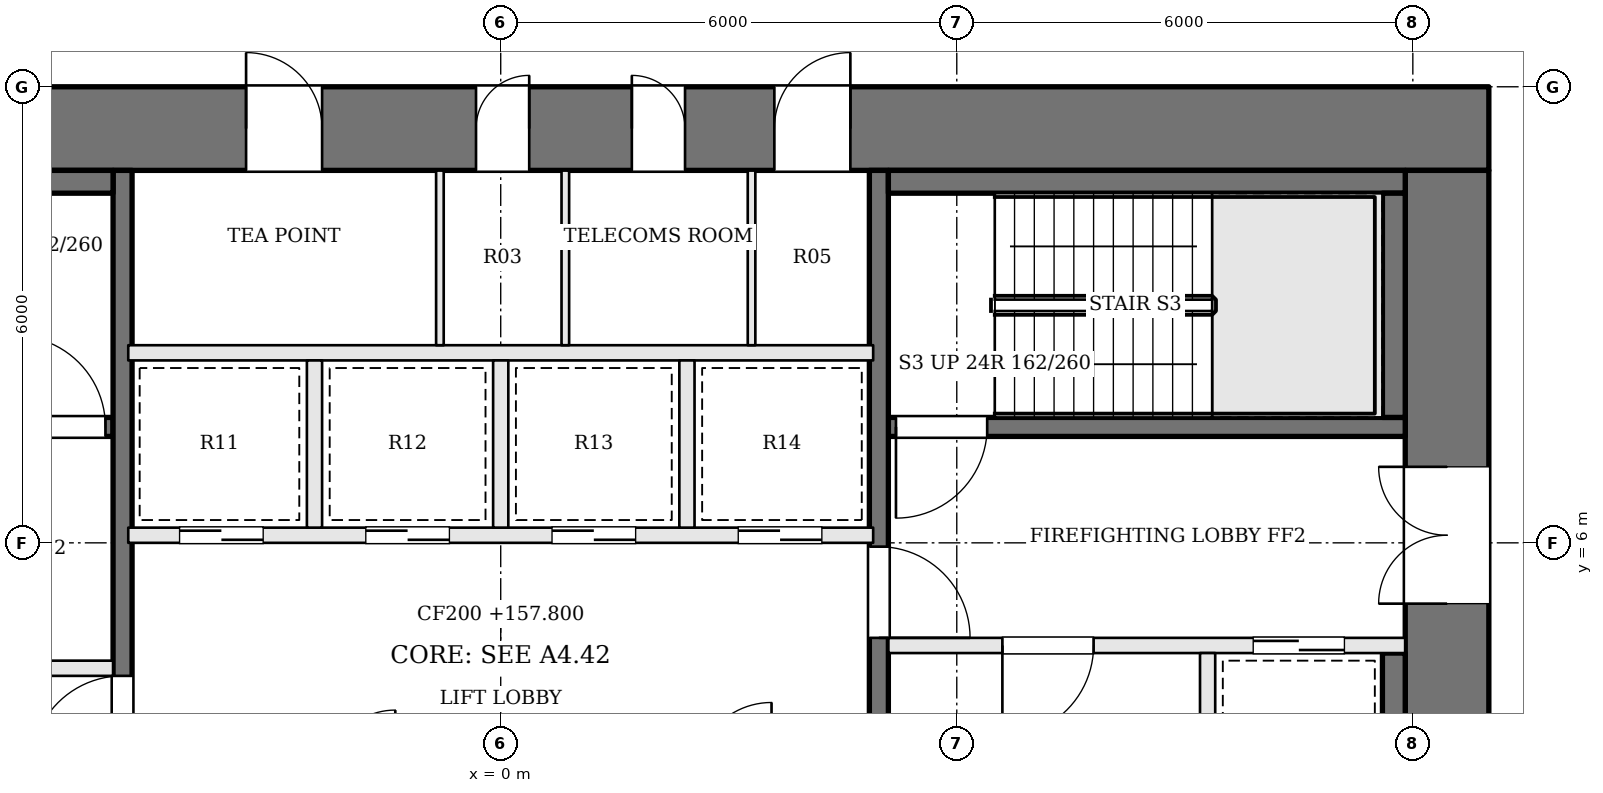
"""IFC4 building model, lengths in metres.
Left out: names, types, materials, properties, quantities, classifications, styles, units other than length and angle.
Written with IfcOpenShell. Run it as: python <this file> out.ifc"""

import sys

from ifc_helpers import new_model, si_unit, direction, frame, frame_2d, origin, place, context, subcontext, project, spatial, rectangle, extrude, element, fill, save


model = new_model("IFC4")
c1 = context("Model", 3, precision=1e-05, world=origin(), true_north=direction((0.0, 1.0)))
c2 = subcontext(c1, "Body", "Model", "MODEL_VIEW")
j1 = project(units=[si_unit("LENGTHUNIT", "METRE"), si_unit("PLANEANGLEUNIT", "RADIAN")], contexts=[c1])
p1 = place(None, origin())
s1 = spatial("IfcSite", under=j1, at=p1, CompositionType="ELEMENT")
p2 = place(p1, origin())
s2 = spatial("IfcBuilding", under=s1, at=p2, CompositionType="ELEMENT")
p3 = place(p2, frame((0.0, 0.0, 157.8)))
s3 = spatial("IfcBuildingStorey", under=s2, at=p3, CompositionType="ELEMENT", Elevation=157.8)
p4 = place(p3, frame((-13.0, 11.45, 0.0), z_axis=(0.0, 0.0, 1.0), x_axis=(1.0, 0.0, 0.0)))
e1 = element("IfcWall", 1, at=p4, inside=s3, PredefinedType="SHEAR", context=c2, shape_type="SweptSolid", body=[
    extrude(rectangle(XDim=26.0, YDim=1.1, at=frame_2d((13.0, 0.0))), origin(), (0.0, 0.0, 1.0), 3.9),
])
p5 = place(p4, frame((9.65, 0.0, 0.0)))
e2 = element("IfcOpeningElement", 2, at=p5, cuts=e1, PredefinedType="OPENING", context=c2, shape_type="SweptSolid", body=[
    extrude(rectangle(XDim=1.0, YDim=2.1, at=frame_2d((0.5, 1.05))), frame((0.0, 0.56, 0.0), z_axis=(0.0, -1.0, 0.0), x_axis=(1.0, 0.0, 0.0)), (0.0, 0.0, 1.0), 1.12),
])
p6 = place(p4, frame((12.675, 0.0, 0.0)))
e3 = element("IfcOpeningElement", 3, at=p6, cuts=e1, PredefinedType="OPENING", context=c2, shape_type="SweptSolid", body=[
    extrude(rectangle(XDim=0.7, YDim=2.1, at=frame_2d((0.35, 1.05))), frame((0.0, 0.56, 0.0), z_axis=(0.0, -1.0, 0.0), x_axis=(1.0, 0.0, 0.0)), (0.0, 0.0, 1.0), 1.12),
])
p7 = place(p4, frame((14.725, 0.0, 0.0)))
e4 = element("IfcOpeningElement", 4, at=p7, cuts=e1, PredefinedType="OPENING", context=c2, shape_type="SweptSolid", body=[
    extrude(rectangle(XDim=0.7, YDim=2.1, at=frame_2d((0.35, 1.05))), frame((0.0, 0.56, 0.0), z_axis=(0.0, -1.0, 0.0), x_axis=(1.0, 0.0, 0.0)), (0.0, 0.0, 1.0), 1.12),
])
p8 = place(p4, frame((16.6, 0.0, 0.0)))
e5 = element("IfcOpeningElement", 5, at=p8, cuts=e1, PredefinedType="OPENING", context=c2, shape_type="SweptSolid", body=[
    extrude(rectangle(XDim=1.0, YDim=2.1, at=frame_2d((0.5, 1.05))), frame((0.0, 0.56, 0.0), z_axis=(0.0, -1.0, 0.0), x_axis=(1.0, 0.0, 0.0)), (0.0, 0.0, 1.0), 1.12),
])
p9 = place(p3, frame((12.45, -1.9, 0.0), z_axis=(0.0, 0.0, 1.0), x_axis=(0.0, 1.0, 0.0)))
e6 = element("IfcWall", 6, at=p9, inside=s3, PredefinedType="SHEAR", context=c2, shape_type="SweptSolid", body=[
    extrude(rectangle(XDim=12.8, YDim=1.1, at=frame_2d((6.4, 0.0))), origin(), (0.0, 0.0, 1.0), 3.9),
])
p10 = place(p9, frame((7.1, 0.0, 0.0)))
e7 = element("IfcOpeningElement", 7, at=p10, cuts=e6, PredefinedType="OPENING", context=c2, shape_type="SweptSolid", body=[
    extrude(rectangle(XDim=1.8, YDim=2.1, at=frame_2d((0.9, 1.05))), frame((0.0, 0.56, 0.0), z_axis=(0.0, -1.0, 0.0), x_axis=(1.0, 0.0, 0.0)), (0.0, 0.0, 1.0), 1.12),
])
p11 = place(p3, frame((11.9, 7.525, 0.0), z_axis=(0.0, 0.0, 1.0), x_axis=(-1.0, 0.0, 0.0)))
e8 = element("IfcWall", 8, at=p11, inside=s3, PredefinedType="SOLIDWALL", context=c2, shape_type="SweptSolid", body=[
    extrude(rectangle(XDim=6.8, YDim=0.25, at=frame_2d((3.4, 0.0))), origin(), (0.0, 0.0, 1.0), 3.7),
])
p12 = place(p11, frame((5.5, 0.0, 0.0)))
e9 = element("IfcOpeningElement", 9, at=p12, cuts=e8, PredefinedType="OPENING", context=c2, shape_type="SweptSolid", body=[
    extrude(rectangle(XDim=1.2, YDim=2.1, at=frame_2d((0.6, 1.05))), frame((0.0, 0.135, 0.0), z_axis=(0.0, -1.0, 0.0), x_axis=(1.0, 0.0, 0.0)), (0.0, 0.0, 1.0), 0.27),
])
p13 = place(p3, frame((-11.9, 4.35, 0.0), z_axis=(0.0, 0.0, 1.0), x_axis=(1.0, 0.0, 0.0)))
e10 = element("IfcWall", 10, at=p13, inside=s3, PredefinedType="SOLIDWALL", context=c2, shape_type="SweptSolid", body=[
    extrude(rectangle(XDim=6.8, YDim=0.2, at=frame_2d((3.4, 0.0))), origin(), (0.0, 0.0, 1.0), 3.7),
])
p14 = place(p13, frame((4.1, 0.0, 0.0)))
e11 = element("IfcOpeningElement", 11, at=p14, cuts=e10, PredefinedType="OPENING", context=c2, shape_type="SweptSolid", body=[
    extrude(rectangle(XDim=1.2, YDim=2.1, at=frame_2d((0.6, 1.05))), frame((0.0, 0.11, 0.0), z_axis=(0.0, -1.0, 0.0), x_axis=(1.0, 0.0, 0.0)), (0.0, 0.0, 1.0), 0.22),
])
p15 = place(p13, frame((0.8, 0.0, 0.0)))
e12 = element("IfcOpeningElement", 12, at=p15, cuts=e10, PredefinedType="OPENING", context=c2, shape_type="SweptSolid", body=[
    extrude(rectangle(XDim=1.2, YDim=2.1, at=frame_2d((0.6, 1.05))), frame((0.0, 0.11, 0.0), z_axis=(0.0, -1.0, 0.0), x_axis=(1.0, 0.0, 0.0)), (0.0, 0.0, 1.0), 0.22),
])
p16 = place(p3, frame((11.9, 4.65, 0.0), z_axis=(0.0, 0.0, 1.0), x_axis=(-1.0, 0.0, 0.0)))
e13 = element("IfcWall", 13, at=p16, inside=s3, PredefinedType="SOLIDWALL", context=c2, shape_type="SweptSolid", body=[
    extrude(rectangle(XDim=6.8, YDim=0.2, at=frame_2d((3.4, 0.0))), origin(), (0.0, 0.0, 1.0), 3.7),
])
p17 = place(p16, frame((4.1, 0.0, 0.0)))
e14 = element("IfcOpeningElement", 14, at=p17, cuts=e13, PredefinedType="OPENING", context=c2, shape_type="SweptSolid", body=[
    extrude(rectangle(XDim=1.2, YDim=2.1, at=frame_2d((0.6, 1.05))), frame((0.0, 0.11, 0.0), z_axis=(0.0, -1.0, 0.0), x_axis=(1.0, 0.0, 0.0)), (0.0, 0.0, 1.0), 0.22),
])
p18 = place(p16, frame((0.8, 0.0, 0.0)))
e15 = element("IfcOpeningElement", 15, at=p18, cuts=e13, PredefinedType="OPENING", context=c2, shape_type="SweptSolid", body=[
    extrude(rectangle(XDim=1.2, YDim=2.1, at=frame_2d((0.6, 1.05))), frame((0.0, 0.11, 0.0), z_axis=(0.0, -1.0, 0.0), x_axis=(1.0, 0.0, 0.0)), (0.0, 0.0, 1.0), 0.22),
])
p19 = place(p3, frame((-11.9, 7.525, 0.0), z_axis=(0.0, 0.0, 1.0), x_axis=(1.0, 0.0, 0.0)))
e16 = element("IfcWall", 16, at=p19, inside=s3, PredefinedType="SOLIDWALL", context=c2, shape_type="SweptSolid", body=[
    extrude(rectangle(XDim=6.8, YDim=0.25, at=frame_2d((3.4, 0.0))), origin(), (0.0, 0.0, 1.0), 3.7),
])
p20 = place(p19, frame((5.5, 0.0, 0.0)))
e17 = element("IfcOpeningElement", 17, at=p20, cuts=e16, PredefinedType="OPENING", context=c2, shape_type="SweptSolid", body=[
    extrude(rectangle(XDim=1.2, YDim=2.1, at=frame_2d((0.6, 1.05))), frame((0.0, 0.135, 0.0), z_axis=(0.0, -1.0, 0.0), x_axis=(1.0, 0.0, 0.0)), (0.0, 0.0, 1.0), 0.27),
])
p21 = place(p3, frame((9.3, 4.55, 0.0), z_axis=(0.0, 0.0, 1.0), x_axis=(0.0, -1.0, 0.0)))
e18 = element("IfcWall", 18, at=p21, inside=s3, PredefinedType="SOLIDWALL", context=c2, shape_type="SweptSolid", body=[
    extrude(rectangle(XDim=3.0, YDim=0.2, at=frame_2d((1.5, 0.0))), origin(), (0.0, 0.0, 1.0), 3.7),
])
p22 = place(p3, frame((-4.975, -1.9, 0.0), z_axis=(0.0, 0.0, 1.0), x_axis=(0.0, 1.0, 0.0)))
e19 = element("IfcWall", 19, at=p22, inside=s3, PredefinedType="SOLIDWALL", context=c2, shape_type="SweptSolid", body=[
    extrude(rectangle(XDim=12.8, YDim=0.25, at=frame_2d((6.4, 0.0))), origin(), (0.0, 0.0, 1.0), 3.7),
])
p23 = place(p22, frame((4.95, 0.0, 0.0)))
e20 = element("IfcOpeningElement", 20, at=p23, cuts=e19, PredefinedType="OPENING", context=c2, shape_type="SweptSolid", body=[
    extrude(rectangle(XDim=1.2, YDim=2.1, at=frame_2d((0.6, 1.05))), frame((0.0, 0.135, 0.0), z_axis=(0.0, -1.0, 0.0), x_axis=(1.0, 0.0, 0.0)), (0.0, 0.0, 1.0), 0.27),
])
p24 = place(p3, frame((4.975, 10.9, 0.0), z_axis=(0.0, 0.0, 1.0), x_axis=(0.0, -1.0, 0.0)))
e21 = element("IfcWall", 21, at=p24, inside=s3, PredefinedType="SOLIDWALL", context=c2, shape_type="SweptSolid", body=[
    extrude(rectangle(XDim=12.8, YDim=0.25, at=frame_2d((6.4, 0.0))), origin(), (0.0, 0.0, 1.0), 3.7),
])
p25 = place(p24, frame((4.95, 0.0, 0.0)))
e22 = element("IfcOpeningElement", 22, at=p25, cuts=e21, PredefinedType="OPENING", context=c2, shape_type="SweptSolid", body=[
    extrude(rectangle(XDim=1.2, YDim=2.1, at=frame_2d((0.6, 1.05))), frame((0.0, 0.135, 0.0), z_axis=(0.0, -1.0, 0.0), x_axis=(1.0, 0.0, 0.0)), (0.0, 0.0, 1.0), 0.27),
])
for number, where, z_axis, x_axis in (
    (23, (-11.9, 10.75, 0.0), (0.0, 0.0, 1.0), (1.0, 0.0, 0.0)),
    (24, (11.9, 10.75, 0.0), (0.0, 0.0, 1.0), (-1.0, 0.0, 0.0)),
):
    element("IfcWall", number, at=place(p3, frame(where, z_axis=z_axis, x_axis=x_axis)), inside=s3, PredefinedType="SOLIDWALL", context=c2, shape_type="SweptSolid", body=[
        extrude(rectangle(XDim=6.8, YDim=0.3, at=frame_2d((3.4, 0.0))), origin(), (0.0, 0.0, 1.0), 3.7),
    ])
p26 = place(p3, frame((11.75, 10.6, 0.0), z_axis=(0.0, 0.0, 1.0), x_axis=(0.0, -1.0, 0.0)))
e25 = element("IfcWall", 25, at=p26, inside=s3, PredefinedType="SOLIDWALL", context=c2, shape_type="SweptSolid", body=[
    extrude(rectangle(XDim=2.95, YDim=0.3, at=frame_2d((1.475, 0.0))), origin(), (0.0, 0.0, 1.0), 3.7),
])
p27 = place(p3, frame((11.75, 4.55, 0.0), z_axis=(0.0, 0.0, 1.0), x_axis=(0.0, -1.0, 0.0)))
e26 = element("IfcWall", 26, at=p27, inside=s3, PredefinedType="SOLIDWALL", context=c2, shape_type="SweptSolid", body=[
    extrude(rectangle(XDim=3.0, YDim=0.3, at=frame_2d((1.5, 0.0))), origin(), (0.0, 0.0, 1.0), 3.7),
])
p28 = place(p3, frame((-4.9, 6.1, 0.0), z_axis=(0.0, 0.0, 1.0), x_axis=(1.0, 0.0, 0.0)))
e27 = element("IfcWall", 27, at=p28, inside=s3, PredefinedType="SOLIDWALL", context=c2, shape_type="SweptSolid", body=[
    extrude(rectangle(XDim=9.8, YDim=0.2, at=frame_2d((4.9, 0.0))), origin(), (0.0, 0.0, 1.0), 3.7),
])
p29 = place(p28, frame((0.675, 0.0, 0.0)))
e28 = element("IfcOpeningElement", 28, at=p29, cuts=e27, PredefinedType="OPENING", context=c2, shape_type="SweptSolid", body=[
    extrude(rectangle(XDim=1.1, YDim=2.1, at=frame_2d((0.55, 1.05))), frame((0.0, 0.11, 0.0), z_axis=(0.0, -1.0, 0.0), x_axis=(1.0, 0.0, 0.0)), (0.0, 0.0, 1.0), 0.22),
])
p30 = place(p28, frame((3.125, 0.0, 0.0)))
e29 = element("IfcOpeningElement", 29, at=p30, cuts=e27, PredefinedType="OPENING", context=c2, shape_type="SweptSolid", body=[
    extrude(rectangle(XDim=1.1, YDim=2.1, at=frame_2d((0.55, 1.05))), frame((0.0, 0.11, 0.0), z_axis=(0.0, -1.0, 0.0), x_axis=(1.0, 0.0, 0.0)), (0.0, 0.0, 1.0), 0.22),
])
p31 = place(p28, frame((5.575, 0.0, 0.0)))
e30 = element("IfcOpeningElement", 30, at=p31, cuts=e27, PredefinedType="OPENING", context=c2, shape_type="SweptSolid", body=[
    extrude(rectangle(XDim=1.1, YDim=2.1, at=frame_2d((0.55, 1.05))), frame((0.0, 0.11, 0.0), z_axis=(0.0, -1.0, 0.0), x_axis=(1.0, 0.0, 0.0)), (0.0, 0.0, 1.0), 0.22),
])
p32 = place(p28, frame((8.025, 0.0, 0.0)))
e31 = element("IfcOpeningElement", 31, at=p32, cuts=e27, PredefinedType="OPENING", context=c2, shape_type="SweptSolid", body=[
    extrude(rectangle(XDim=1.1, YDim=2.1, at=frame_2d((0.55, 1.05))), frame((0.0, 0.11, 0.0), z_axis=(0.0, -1.0, 0.0), x_axis=(1.0, 0.0, 0.0)), (0.0, 0.0, 1.0), 0.22),
])
p33 = place(p3, frame((-4.9, 8.5, 0.0), z_axis=(0.0, 0.0, 1.0), x_axis=(1.0, 0.0, 0.0)))
e32 = element("IfcWall", 32, at=p33, inside=s3, PredefinedType="SOLIDWALL", context=c2, shape_type="SweptSolid", body=[
    extrude(rectangle(XDim=9.8, YDim=0.2, at=frame_2d((4.9, 0.0))), origin(), (0.0, 0.0, 1.0), 3.7),
])
for number, where, z_axis, x_axis in (
    (33, (-2.45, 6.2, 0.0), (0.0, 0.0, 1.0), (0.0, 1.0, 0.0)),
    (34, (0.0, 6.2, 0.0), (0.0, 0.0, 1.0), (0.0, 1.0, 0.0)),
    (35, (2.45, 6.2, 0.0), (0.0, 0.0, 1.0), (0.0, 1.0, 0.0)),
):
    element("IfcWall", number, at=place(p3, frame(where, z_axis=z_axis, x_axis=x_axis)), inside=s3, PredefinedType="SOLIDWALL", context=c2, shape_type="SweptSolid", body=[
        extrude(rectangle(XDim=2.2, YDim=0.2, at=frame_2d((1.1, 0.0))), origin(), (0.0, 0.0, 1.0), 3.7),
    ])
for number, where, z_axis, x_axis in (
    (36, (-0.8, 8.6, 0.0), (0.0, 0.0, 1.0), (0.0, 1.0, 0.0)),
    (37, (0.85, 8.6, 0.0), (0.0, 0.0, 1.0), (0.0, 1.0, 0.0)),
    (38, (3.3, 8.6, 0.0), (0.0, 0.0, 1.0), (0.0, 1.0, 0.0)),
):
    element("IfcWall", number, at=place(p3, frame(where, z_axis=z_axis, x_axis=x_axis)), inside=s3, PredefinedType="PARTITIONING", context=c2, shape_type="SweptSolid", body=[
        extrude(rectangle(XDim=2.3, YDim=0.1, at=frame_2d((1.15, 0.0))), origin(), (0.0, 0.0, 1.0), 3.7),
    ])
p34 = place(p10, origin())
e39 = element("IfcDoor", 39, at=p34, inside=s3, OperationType="DOUBLE_DOOR_SINGLE_SWING", PredefinedType="DOOR", context=c2, shape_type="SweptSolid", body=[
    extrude(rectangle(XDim=1.8, YDim=2.1, at=frame_2d((0.9, 1.05))), frame((0.0, 0.025, 0.0), z_axis=(0.0, -1.0, 0.0), x_axis=(1.0, 0.0, 0.0)), (0.0, 0.0, 1.0), 0.05),
])
fill(e7, e39)
p35 = place(p23, origin())
e40 = element("IfcDoor", 40, at=p35, inside=s3, OperationType="SINGLE_SWING_LEFT", PredefinedType="DOOR", context=c2, shape_type="SweptSolid", body=[
    extrude(rectangle(XDim=1.2, YDim=2.1, at=frame_2d((0.6, 1.05))), frame((0.0, 0.025, 0.0), z_axis=(0.0, -1.0, 0.0), x_axis=(1.0, 0.0, 0.0)), (0.0, 0.0, 1.0), 0.05),
])
fill(e20, e40)
p36 = place(p25, origin())
e41 = element("IfcDoor", 41, at=p36, inside=s3, OperationType="SINGLE_SWING_RIGHT", PredefinedType="DOOR", context=c2, shape_type="SweptSolid", body=[
    extrude(rectangle(XDim=1.2, YDim=2.1, at=frame_2d((0.6, 1.05))), frame((0.0, 0.025, 0.0), z_axis=(0.0, -1.0, 0.0), x_axis=(1.0, 0.0, 0.0)), (0.0, 0.0, 1.0), 0.05),
])
fill(e22, e41)
p37 = place(p17, origin())
e42 = element("IfcDoor", 42, at=p37, inside=s3, OperationType="SINGLE_SWING_RIGHT", PredefinedType="DOOR", context=c2, shape_type="SweptSolid", body=[
    extrude(rectangle(XDim=1.2, YDim=2.1, at=frame_2d((0.6, 1.05))), frame((0.0, 0.025, 0.0), z_axis=(0.0, -1.0, 0.0), x_axis=(1.0, 0.0, 0.0)), (0.0, 0.0, 1.0), 0.05),
])
fill(e14, e42)
p38 = place(p12, origin())
e43 = element("IfcDoor", 43, at=p38, inside=s3, OperationType="SINGLE_SWING_RIGHT", PredefinedType="DOOR", context=c2, shape_type="SweptSolid", body=[
    extrude(rectangle(XDim=1.2, YDim=2.1, at=frame_2d((0.6, 1.05))), frame((0.0, 0.025, 0.0), z_axis=(0.0, -1.0, 0.0), x_axis=(1.0, 0.0, 0.0)), (0.0, 0.0, 1.0), 0.05),
])
fill(e9, e43)
p39 = place(p20, origin())
e44 = element("IfcDoor", 44, at=p39, inside=s3, OperationType="SINGLE_SWING_LEFT", PredefinedType="DOOR", context=c2, shape_type="SweptSolid", body=[
    extrude(rectangle(XDim=1.2, YDim=2.1, at=frame_2d((0.6, 1.05))), frame((0.0, 0.025, 0.0), z_axis=(0.0, -1.0, 0.0), x_axis=(1.0, 0.0, 0.0)), (0.0, 0.0, 1.0), 0.05),
])
fill(e17, e44)
p40 = place(p18, origin())
e45 = element("IfcDoor", 45, at=p40, inside=s3, OperationType="SLIDING_TO_RIGHT", PredefinedType="DOOR", context=c2, shape_type="SweptSolid", body=[
    extrude(rectangle(XDim=1.2, YDim=2.1, at=frame_2d((0.6, 1.05))), frame((0.0, 0.025, 0.0), z_axis=(0.0, -1.0, 0.0), x_axis=(1.0, 0.0, 0.0)), (0.0, 0.0, 1.0), 0.05),
])
fill(e15, e45)
p41 = place(p29, origin())
e46 = element("IfcDoor", 46, at=p41, inside=s3, OperationType="SLIDING_TO_RIGHT", PredefinedType="DOOR", context=c2, shape_type="SweptSolid", body=[
    extrude(rectangle(XDim=1.1, YDim=2.1, at=frame_2d((0.55, 1.05))), frame((0.0, 0.025, 0.0), z_axis=(0.0, -1.0, 0.0), x_axis=(1.0, 0.0, 0.0)), (0.0, 0.0, 1.0), 0.05),
])
fill(e28, e46)
p42 = place(p30, origin())
e47 = element("IfcDoor", 47, at=p42, inside=s3, OperationType="SLIDING_TO_LEFT", PredefinedType="DOOR", context=c2, shape_type="SweptSolid", body=[
    extrude(rectangle(XDim=1.1, YDim=2.1, at=frame_2d((0.55, 1.05))), frame((0.0, 0.025, 0.0), z_axis=(0.0, -1.0, 0.0), x_axis=(1.0, 0.0, 0.0)), (0.0, 0.0, 1.0), 0.05),
])
fill(e29, e47)
p43 = place(p31, origin())
e48 = element("IfcDoor", 48, at=p43, inside=s3, OperationType="SLIDING_TO_RIGHT", PredefinedType="DOOR", context=c2, shape_type="SweptSolid", body=[
    extrude(rectangle(XDim=1.1, YDim=2.1, at=frame_2d((0.55, 1.05))), frame((0.0, 0.025, 0.0), z_axis=(0.0, -1.0, 0.0), x_axis=(1.0, 0.0, 0.0)), (0.0, 0.0, 1.0), 0.05),
])
fill(e30, e48)
p44 = place(p32, origin())
e49 = element("IfcDoor", 49, at=p44, inside=s3, OperationType="SLIDING_TO_LEFT", PredefinedType="DOOR", context=c2, shape_type="SweptSolid", body=[
    extrude(rectangle(XDim=1.1, YDim=2.1, at=frame_2d((0.55, 1.05))), frame((0.0, 0.025, 0.0), z_axis=(0.0, -1.0, 0.0), x_axis=(1.0, 0.0, 0.0)), (0.0, 0.0, 1.0), 0.05),
])
fill(e31, e49)
p45 = place(p5, origin())
e50 = element("IfcDoor", 50, at=p45, inside=s3, OperationType="SINGLE_SWING_LEFT", PredefinedType="DOOR", context=c2, shape_type="SweptSolid", body=[
    extrude(rectangle(XDim=1.0, YDim=2.1, at=frame_2d((0.5, 1.05))), frame((0.0, 0.025, 0.0), z_axis=(0.0, -1.0, 0.0), x_axis=(1.0, 0.0, 0.0)), (0.0, 0.0, 1.0), 0.05),
])
fill(e2, e50)
p46 = place(p6, origin())
e51 = element("IfcDoor", 51, at=p46, inside=s3, OperationType="SINGLE_SWING_RIGHT", PredefinedType="DOOR", context=c2, shape_type="SweptSolid", body=[
    extrude(rectangle(XDim=0.7, YDim=2.1, at=frame_2d((0.35, 1.05))), frame((0.0, 0.025, 0.0), z_axis=(0.0, -1.0, 0.0), x_axis=(1.0, 0.0, 0.0)), (0.0, 0.0, 1.0), 0.05),
])
fill(e3, e51)
p47 = place(p7, origin())
e52 = element("IfcDoor", 52, at=p47, inside=s3, OperationType="SINGLE_SWING_LEFT", PredefinedType="DOOR", context=c2, shape_type="SweptSolid", body=[
    extrude(rectangle(XDim=0.7, YDim=2.1, at=frame_2d((0.35, 1.05))), frame((0.0, 0.025, 0.0), z_axis=(0.0, -1.0, 0.0), x_axis=(1.0, 0.0, 0.0)), (0.0, 0.0, 1.0), 0.05),
])
fill(e4, e52)
p48 = place(p8, origin())
e53 = element("IfcDoor", 53, at=p48, inside=s3, OperationType="SINGLE_SWING_RIGHT", PredefinedType="DOOR", context=c2, shape_type="SweptSolid", body=[
    extrude(rectangle(XDim=1.0, YDim=2.1, at=frame_2d((0.5, 1.05))), frame((0.0, 0.025, 0.0), z_axis=(0.0, -1.0, 0.0), x_axis=(1.0, 0.0, 0.0)), (0.0, 0.0, 1.0), 0.05),
])
fill(e5, e53)
save(model, sys.argv[1])
